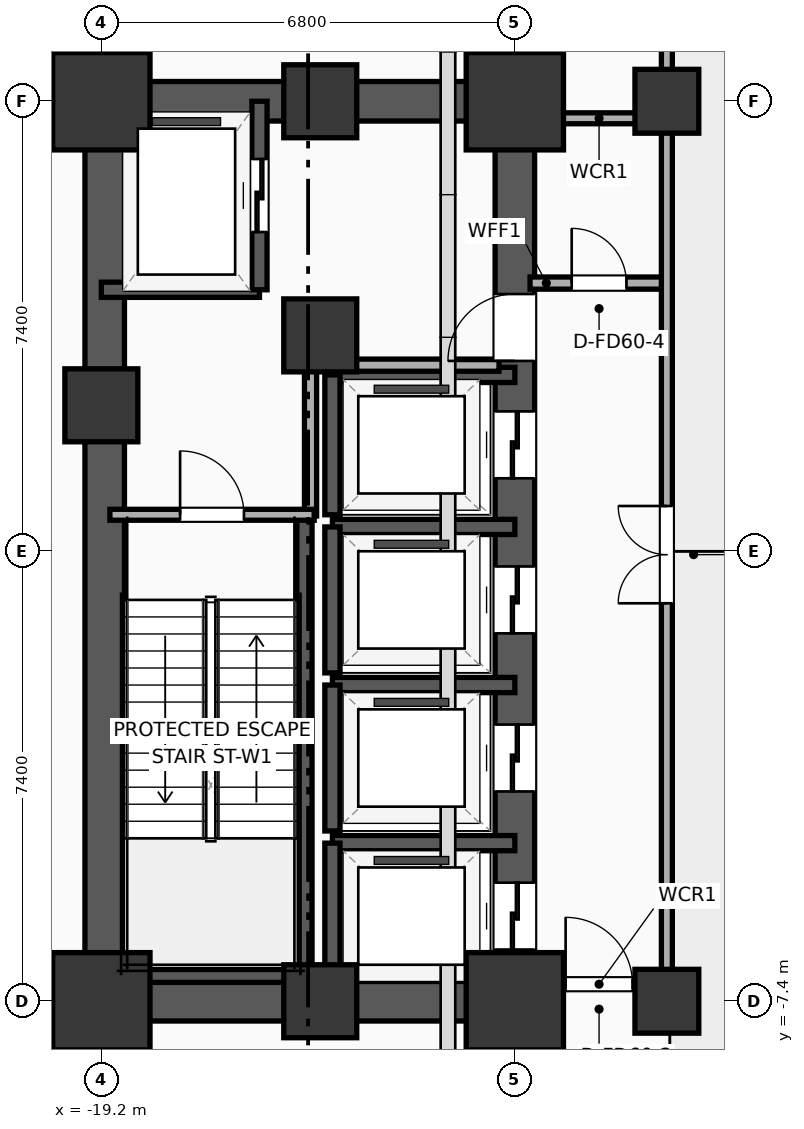
"""IFC4 building model, lengths in metres.
Left out: names, types, materials, properties, quantities, classifications, styles, units other than length and angle.
Written with IfcOpenShell. Run it as: python <this file> out.ifc"""

import sys

from ifc_helpers import new_model, si_unit, direction, frame, frame_2d, origin, origin_2d, place, context, subcontext, project, spatial, rectangle, extrude, element, fill, save


model = new_model("IFC4")
c1 = context("Model", 3, precision=1e-05, world=origin(), true_north=direction((0.0, 1.0)))
c2 = subcontext(c1, "Body", "Model", "MODEL_VIEW")
j1 = project(units=[si_unit("LENGTHUNIT", "METRE"), si_unit("PLANEANGLEUNIT", "RADIAN")], contexts=[c1])
p1 = place(None, origin())
s1 = spatial("IfcSite", under=j1, at=p1, CompositionType="ELEMENT")
p2 = place(p1, origin())
s2 = spatial("IfcBuilding", under=s1, at=p2, CompositionType="ELEMENT")
p3 = place(p2, origin())
s3 = spatial("IfcBuildingStorey", under=s2, at=p3, CompositionType="ELEMENT", Elevation=0.0)
p4 = place(p3, frame((-19.2, -7.4, 0.0), z_axis=(0.0, 0.0, 1.0), x_axis=(1.0, 0.0, 0.0)))
e1 = element("IfcColumn", 1, at=p4, inside=s3, PredefinedType="COLUMN", context=c2, shape_type="SweptSolid", body=[
    extrude(rectangle(XDim=1.6, YDim=1.6, at=origin_2d()), origin(), (0.0, 0.0, 1.0), 5.2),
])
p5 = place(p3, frame((-19.2, 2.4, 0.0), z_axis=(0.0, 0.0, 1.0), x_axis=(1.0, 0.0, 0.0)))
e2 = element("IfcColumn", 2, at=p5, inside=s3, PredefinedType="COLUMN", context=c2, shape_type="SweptSolid", body=[
    extrude(rectangle(XDim=1.2, YDim=1.2, at=origin_2d()), origin(), (0.0, 0.0, 1.0), 5.2),
])
p6 = place(p3, frame((-19.2, 7.4, 0.0), z_axis=(0.0, 0.0, 1.0), x_axis=(1.0, 0.0, 0.0)))
e3 = element("IfcColumn", 3, at=p6, inside=s3, PredefinedType="COLUMN", context=c2, shape_type="SweptSolid", body=[
    extrude(rectangle(XDim=1.6, YDim=1.6, at=origin_2d()), origin(), (0.0, 0.0, 1.0), 5.2),
])
for number, where, z_axis, x_axis in (
    (4, (-15.6, -7.4, 0.0), (0.0, 0.0, 1.0), (1.0, 0.0, 0.0)),
    (5, (-15.6, 7.4, 0.0), (0.0, 0.0, 1.0), (1.0, 0.0, 0.0)),
):
    element("IfcColumn", number, at=place(p3, frame(where, z_axis=z_axis, x_axis=x_axis)), inside=s3, PredefinedType="COLUMN", context=c2, shape_type="SweptSolid", body=[
        extrude(rectangle(XDim=1.2, YDim=1.2, at=origin_2d()), origin(), (0.0, 0.0, 1.0), 5.2),
    ])
p7 = place(p3, frame((-12.4, -7.4, 0.0), z_axis=(0.0, 0.0, 1.0), x_axis=(1.0, 0.0, 0.0)))
e6 = element("IfcColumn", 6, at=p7, inside=s3, PredefinedType="COLUMN", context=c2, shape_type="SweptSolid", body=[
    extrude(rectangle(XDim=1.6, YDim=1.6, at=origin_2d()), origin(), (0.0, 0.0, 1.0), 5.2),
])
p8 = place(p3, frame((-15.6, 3.55, 0.0), z_axis=(0.0, 0.0, 1.0), x_axis=(1.0, 0.0, 0.0)))
e7 = element("IfcColumn", 7, at=p8, inside=s3, PredefinedType="COLUMN", context=c2, shape_type="SweptSolid", body=[
    extrude(rectangle(XDim=1.2, YDim=1.2, at=origin_2d()), origin(), (0.0, 0.0, 1.0), 5.2),
])
p9 = place(p3, frame((-12.4, 7.4, 0.0), z_axis=(0.0, 0.0, 1.0), x_axis=(1.0, 0.0, 0.0)))
e8 = element("IfcColumn", 8, at=p9, inside=s3, PredefinedType="COLUMN", context=c2, shape_type="SweptSolid", body=[
    extrude(rectangle(XDim=1.6, YDim=1.6, at=origin_2d()), origin(), (0.0, 0.0, 1.0), 5.2),
])
for number, where, z_axis, x_axis in (
    (9, (-19.525, -7.4, 0.0), (0.0, 0.0, 1.0), (1.0, 0.0, 0.0)),
    (10, (-19.525, 7.4, 0.0), (0.0, 0.0, 1.0), (1.0, 0.0, 0.0)),
):
    element("IfcWall", number, at=place(p3, frame(where, z_axis=z_axis, x_axis=x_axis)), inside=s3, PredefinedType="SHEAR", context=c2, shape_type="SweptSolid", body=[
        extrude(rectangle(XDim=7.45, YDim=0.65, at=frame_2d((3.725, 0.0))), origin(), (0.0, 0.0, 1.0), 4.92),
    ])
p10 = place(p3, frame((-19.145, -7.4, 0.0), z_axis=(0.0, 0.0, 1.0), x_axis=(0.0, 1.0, 0.0)))
e11 = element("IfcWall", 11, at=p10, inside=s3, PredefinedType="SHEAR", context=c2, shape_type="SweptSolid", body=[
    extrude(rectangle(XDim=14.8, YDim=0.65, at=frame_2d((7.4, 0.0))), origin(), (0.0, 0.0, 1.0), 4.92),
])
p11 = place(p3, frame((-12.4, -7.4, 0.0), z_axis=(0.0, 0.0, 1.0), x_axis=(0.0, 1.0, 0.0)))
e12 = element("IfcWall", 12, at=p11, inside=s3, PredefinedType="SHEAR", context=c2, shape_type="SweptSolid", body=[
    extrude(rectangle(XDim=14.8, YDim=0.65, at=frame_2d((7.4, 0.0))), origin(), (0.0, 0.0, 1.0), 4.92),
])
p12 = place(p11, frame((0.85, 0.0, 0.0)))
e13 = element("IfcOpeningElement", 13, at=p12, cuts=e12, PredefinedType="OPENING", context=c2, shape_type="SweptSolid", body=[
    extrude(rectangle(XDim=1.1, YDim=2.05, at=frame_2d((0.55, 1.025))), frame((0.0, 0.335, 0.0), z_axis=(0.0, -1.0, 0.0), x_axis=(1.0, 0.0, 0.0)), (0.0, 0.0, 1.0), 0.67),
])
p13 = place(p11, frame((3.45, 0.0, 0.0)))
e14 = element("IfcOpeningElement", 14, at=p13, cuts=e12, PredefinedType="OPENING", context=c2, shape_type="SweptSolid", body=[
    extrude(rectangle(XDim=1.1, YDim=2.05, at=frame_2d((0.55, 1.025))), frame((0.0, 0.335, 0.0), z_axis=(0.0, -1.0, 0.0), x_axis=(1.0, 0.0, 0.0)), (0.0, 0.0, 1.0), 0.67),
])
p14 = place(p11, frame((6.05, 0.0, 0.0)))
e15 = element("IfcOpeningElement", 15, at=p14, cuts=e12, PredefinedType="OPENING", context=c2, shape_type="SweptSolid", body=[
    extrude(rectangle(XDim=1.1, YDim=2.05, at=frame_2d((0.55, 1.025))), frame((0.0, 0.335, 0.0), z_axis=(0.0, -1.0, 0.0), x_axis=(1.0, 0.0, 0.0)), (0.0, 0.0, 1.0), 0.67),
])
p15 = place(p11, frame((8.6, 0.0, 0.0)))
e16 = element("IfcOpeningElement", 16, at=p15, cuts=e12, PredefinedType="OPENING", context=c2, shape_type="SweptSolid", body=[
    extrude(rectangle(XDim=1.1, YDim=2.05, at=frame_2d((0.55, 1.025))), frame((0.0, 0.335, 0.0), z_axis=(0.0, -1.0, 0.0), x_axis=(1.0, 0.0, 0.0)), (0.0, 0.0, 1.0), 0.67),
])
p16 = place(p11, frame((10.53, 0.0, 0.0)))
e17 = element("IfcOpeningElement", 17, at=p16, cuts=e12, PredefinedType="OPENING", context=c2, shape_type="SweptSolid", body=[
    extrude(rectangle(XDim=1.1, YDim=2.05, at=frame_2d((0.55, 1.025))), frame((0.0, 0.335, 0.0), z_axis=(0.0, -1.0, 0.0), x_axis=(1.0, 0.0, 0.0)), (0.0, 0.0, 1.0), 0.67),
])
p17 = place(p3, frame((-15.86, -7.085, 0.0), z_axis=(0.0, 0.0, 1.0), x_axis=(0.0, 1.0, 0.0)))
e18 = element("IfcWall", 18, at=p17, inside=s3, PredefinedType="SOLIDWALL", context=c2, shape_type="SweptSolid", body=[
    extrude(rectangle(XDim=7.685, YDim=0.25, at=frame_2d((3.843, 0.0))), origin(), (0.0, 0.0, 1.0), 4.92),
])
p18 = place(p3, frame((-19.2, -6.965, 0.0), z_axis=(0.0, 0.0, 1.0), x_axis=(1.0, 0.0, 0.0)))
e19 = element("IfcWall", 19, at=p18, inside=s3, PredefinedType="SOLIDWALL", context=c2, shape_type="SweptSolid", body=[
    extrude(rectangle(XDim=3.46, YDim=0.25, at=frame_2d((1.73, 0.0))), origin(), (0.0, 0.0, 1.0), 4.92),
])
for number, where, z_axis, x_axis in (
    (20, (-9.9, -7.4, 0.0), (0.0, 0.0, 1.0), (1.0, 0.0, 0.0)),
    (21, (-9.9, 7.4, 0.0), (0.0, 0.0, 1.0), (1.0, 0.0, 0.0)),
):
    element("IfcColumn", number, at=place(p3, frame(where, z_axis=z_axis, x_axis=x_axis)), inside=s3, PredefinedType="COLUMN", context=c2, shape_type="SweptSolid", body=[
        extrude(rectangle(XDim=1.05, YDim=1.05, at=origin_2d()), origin(), (0.0, 0.0, 1.0), 5.2),
    ])
p19 = place(p3, frame((-19.2, 4.3, 0.0), z_axis=(0.0, 0.0, 1.0), x_axis=(1.0, 0.0, 0.0)))
e22 = element("IfcWall", 22, at=p19, inside=s3, PredefinedType="SOLIDWALL", context=c2, shape_type="SweptSolid", body=[
    extrude(rectangle(XDim=2.6, YDim=0.25, at=frame_2d((1.3, 0.0))), origin(), (0.0, 0.0, 1.0), 4.92),
])
p20 = place(p3, frame((-16.6, 4.3, 0.0), z_axis=(0.0, 0.0, 1.0), x_axis=(0.0, 1.0, 0.0)))
e23 = element("IfcWall", 23, at=p20, inside=s3, PredefinedType="SOLIDWALL", context=c2, shape_type="SweptSolid", body=[
    extrude(rectangle(XDim=3.1, YDim=0.25, at=frame_2d((1.55, 0.0))), origin(), (0.0, 0.0, 1.0), 4.92),
])
p21 = place(p20, frame((0.95, 0.0, 0.0)))
e24 = element("IfcOpeningElement", 24, at=p21, cuts=e23, PredefinedType="OPENING", context=c2, shape_type="SweptSolid", body=[
    extrude(rectangle(XDim=1.2, YDim=2.05, at=frame_2d((0.6, 1.025))), frame((0.0, 0.135, 0.0), z_axis=(0.0, -1.0, 0.0), x_axis=(1.0, 0.0, 0.0)), (0.0, 0.0, 1.0), 0.27),
])
p22 = place(p3, frame((-12.4, -4.8, 0.0), z_axis=(0.0, 0.0, 1.0), x_axis=(-1.0, 0.0, 0.0)))
e25 = element("IfcWall", 25, at=p22, inside=s3, PredefinedType="SOLIDWALL", context=c2, shape_type="SweptSolid", body=[
    extrude(rectangle(XDim=3.0, YDim=0.25, at=frame_2d((1.5, 0.0))), origin(), (0.0, 0.0, 1.0), 4.92),
])
p23 = place(p3, frame((-15.4, -4.8, 0.0), z_axis=(0.0, 0.0, 1.0), x_axis=(0.0, -1.0, 0.0)))
e26 = element("IfcWall", 26, at=p23, inside=s3, PredefinedType="SOLIDWALL", context=c2, shape_type="SweptSolid", body=[
    extrude(rectangle(XDim=2.6, YDim=0.25, at=frame_2d((1.3, 0.0))), origin(), (0.0, 0.0, 1.0), 4.92),
])
p24 = place(p3, frame((-12.4, -2.2, 0.0), z_axis=(0.0, 0.0, 1.0), x_axis=(-1.0, 0.0, 0.0)))
e27 = element("IfcWall", 27, at=p24, inside=s3, PredefinedType="SOLIDWALL", context=c2, shape_type="SweptSolid", body=[
    extrude(rectangle(XDim=3.0, YDim=0.25, at=frame_2d((1.5, 0.0))), origin(), (0.0, 0.0, 1.0), 4.92),
])
p25 = place(p3, frame((-15.4, -2.2, 0.0), z_axis=(0.0, 0.0, 1.0), x_axis=(0.0, -1.0, 0.0)))
e28 = element("IfcWall", 28, at=p25, inside=s3, PredefinedType="SOLIDWALL", context=c2, shape_type="SweptSolid", body=[
    extrude(rectangle(XDim=2.4, YDim=0.25, at=frame_2d((1.2, 0.0))), origin(), (0.0, 0.0, 1.0), 4.92),
])
p26 = place(p3, frame((-12.4, 0.4, 0.0), z_axis=(0.0, 0.0, 1.0), x_axis=(-1.0, 0.0, 0.0)))
e29 = element("IfcWall", 29, at=p26, inside=s3, PredefinedType="SOLIDWALL", context=c2, shape_type="SweptSolid", body=[
    extrude(rectangle(XDim=3.0, YDim=0.25, at=frame_2d((1.5, 0.0))), origin(), (0.0, 0.0, 1.0), 4.92),
])
p27 = place(p3, frame((-15.4, 0.4, 0.0), z_axis=(0.0, 0.0, 1.0), x_axis=(0.0, -1.0, 0.0)))
e30 = element("IfcWall", 30, at=p27, inside=s3, PredefinedType="SOLIDWALL", context=c2, shape_type="SweptSolid", body=[
    extrude(rectangle(XDim=2.4, YDim=0.25, at=frame_2d((1.2, 0.0))), origin(), (0.0, 0.0, 1.0), 4.92),
])
p28 = place(p3, frame((-12.4, 2.9, 0.0), z_axis=(0.0, 0.0, 1.0), x_axis=(-1.0, 0.0, 0.0)))
e31 = element("IfcWall", 31, at=p28, inside=s3, PredefinedType="SOLIDWALL", context=c2, shape_type="SweptSolid", body=[
    extrude(rectangle(XDim=3.0, YDim=0.25, at=frame_2d((1.5, 0.0))), origin(), (0.0, 0.0, 1.0), 4.92),
])
p29 = place(p3, frame((-15.4, 2.9, 0.0), z_axis=(0.0, 0.0, 1.0), x_axis=(0.0, -1.0, 0.0)))
e32 = element("IfcWall", 32, at=p29, inside=s3, PredefinedType="SOLIDWALL", context=c2, shape_type="SweptSolid", body=[
    extrude(rectangle(XDim=2.3, YDim=0.25, at=frame_2d((1.15, 0.0))), origin(), (0.0, 0.0, 1.0), 4.92),
])
p30 = place(p3, frame((-15.76, 0.58, 0.0), z_axis=(0.0, 0.0, 1.0), x_axis=(0.0, 1.0, 0.0)))
e33 = element("IfcWall", 33, at=p30, inside=s3, PredefinedType="PARTITIONING", context=c2, shape_type="SweptSolid", body=[
    extrude(rectangle(XDim=2.52, YDim=0.2, at=frame_2d((1.26, 0.0))), origin(), (0.0, 0.0, 1.0), 4.92),
])
p31 = place(p3, frame((-15.82, 3.06, 0.0), z_axis=(0.0, 0.0, 1.0), x_axis=(1.0, 0.0, 0.0)))
e34 = element("IfcWall", 34, at=p31, inside=s3, PredefinedType="PARTITIONING", context=c2, shape_type="SweptSolid", body=[
    extrude(rectangle(XDim=3.16, YDim=0.2, at=frame_2d((1.58, 0.0))), origin(), (0.0, 0.0, 1.0), 4.92),
])
p32 = place(p3, frame((-19.06, 0.6, 0.0), z_axis=(0.0, 0.0, 1.0), x_axis=(1.0, 0.0, 0.0)))
e35 = element("IfcWall", 35, at=p32, inside=s3, PredefinedType="PARTITIONING", context=c2, shape_type="SweptSolid", body=[
    extrude(rectangle(XDim=3.36, YDim=0.18, at=frame_2d((1.68, 0.0))), origin(), (0.0, 0.0, 1.0), 4.92),
])
p33 = place(p32, frame((1.155, 0.0, 0.0)))
e36 = element("IfcOpeningElement", 36, at=p33, cuts=e35, PredefinedType="OPENING", context=c2, shape_type="SweptSolid", body=[
    extrude(rectangle(XDim=1.05, YDim=2.05, at=frame_2d((0.525, 1.025))), frame((0.0, 0.1, 0.0), z_axis=(0.0, -1.0, 0.0), x_axis=(1.0, 0.0, 0.0)), (0.0, 0.0, 1.0), 0.2),
])
p34 = place(p3, frame((-12.15, 4.41, 0.0), z_axis=(0.0, 0.0, 1.0), x_axis=(1.0, 0.0, 0.0)))
e37 = element("IfcWall", 37, at=p34, inside=s3, PredefinedType="PARTITIONING", context=c2, shape_type="SweptSolid", body=[
    extrude(rectangle(XDim=2.27, YDim=0.2, at=frame_2d((1.135, 0.0))), origin(), (0.0, 0.0, 1.0), 4.92),
])
p35 = place(p34, frame((0.685, 0.0, 0.0)))
e38 = element("IfcOpeningElement", 38, at=p35, cuts=e37, PredefinedType="OPENING", context=c2, shape_type="SweptSolid", body=[
    extrude(rectangle(XDim=0.9, YDim=2.05, at=frame_2d((0.45, 1.025))), frame((0.0, 0.11, 0.0), z_axis=(0.0, -1.0, 0.0), x_axis=(1.0, 0.0, 0.0)), (0.0, 0.0, 1.0), 0.22),
])
p36 = place(p3, frame((-12.15, 7.12, 0.0), z_axis=(0.0, 0.0, 1.0), x_axis=(1.0, 0.0, 0.0)))
e39 = element("IfcWall", 39, at=p36, inside=s3, PredefinedType="PARTITIONING", context=c2, shape_type="SweptSolid", body=[
    extrude(rectangle(XDim=2.27, YDim=0.18, at=frame_2d((1.135, 0.0))), origin(), (0.0, 0.0, 1.0), 4.21),
])
p37 = place(p3, frame((-12.15, -7.12, 0.0), z_axis=(0.0, 0.0, 1.0), x_axis=(1.0, 0.0, 0.0)))
e40 = element("IfcWall", 40, at=p37, inside=s3, PredefinedType="PARTITIONING", context=c2, shape_type="SweptSolid", body=[
    extrude(rectangle(XDim=2.27, YDim=0.18, at=frame_2d((1.135, 0.0))), origin(), (0.0, 0.0, 1.0), 4.21),
])
p38 = place(p37, frame((0.585, 0.0, 0.0)))
e41 = element("IfcOpeningElement", 41, at=p38, cuts=e40, PredefinedType="OPENING", context=c2, shape_type="SweptSolid", body=[
    extrude(rectangle(XDim=1.1, YDim=2.05, at=frame_2d((0.55, 1.025))), frame((0.0, 0.1, 0.0), z_axis=(0.0, -1.0, 0.0), x_axis=(1.0, 0.0, 0.0)), (0.0, 0.0, 1.0), 0.2),
])
p39 = place(p3, frame((-9.9, -7.12, 0.0), z_axis=(0.0, 0.0, 1.0), x_axis=(0.0, 1.0, 0.0)))
e42 = element("IfcWall", 42, at=p39, inside=s3, PredefinedType="PARTITIONING", context=c2, shape_type="SweptSolid", body=[
    extrude(rectangle(XDim=16.82, YDim=0.18, at=frame_2d((8.41, 0.0))), origin(), (0.0, 0.0, 1.0), 4.21),
])
p40 = place(p39, frame((6.264, 0.0, 0.0)))
e43 = element("IfcOpeningElement", 43, at=p40, cuts=e42, PredefinedType="OPENING", context=c2, shape_type="SweptSolid", body=[
    extrude(rectangle(XDim=1.6, YDim=2.05, at=frame_2d((0.8, 1.025))), frame((0.0, 0.1, 0.0), z_axis=(0.0, -1.0, 0.0), x_axis=(1.0, 0.0, 0.0)), (0.0, 0.0, 1.0), 0.2),
])
p41 = place(p21, origin())
e44 = element("IfcDoor", 44, at=p41, inside=s3, OperationType="SLIDING_TO_LEFT", PredefinedType="DOOR", context=c2, shape_type="SweptSolid", body=[
    extrude(rectangle(XDim=1.2, YDim=2.05, at=frame_2d((0.6, 1.025))), frame((0.0, 0.025, 0.0), z_axis=(0.0, -1.0, 0.0), x_axis=(1.0, 0.0, 0.0)), (0.0, 0.0, 1.0), 0.05),
])
fill(e24, e44)
p42 = place(p12, origin())
e45 = element("IfcDoor", 45, at=p42, inside=s3, OperationType="SLIDING_TO_LEFT", PredefinedType="DOOR", context=c2, shape_type="SweptSolid", body=[
    extrude(rectangle(XDim=1.1, YDim=2.05, at=frame_2d((0.55, 1.025))), frame((0.0, 0.025, 0.0), z_axis=(0.0, -1.0, 0.0), x_axis=(1.0, 0.0, 0.0)), (0.0, 0.0, 1.0), 0.05),
])
fill(e13, e45)
p43 = place(p13, origin())
e46 = element("IfcDoor", 46, at=p43, inside=s3, OperationType="SLIDING_TO_LEFT", PredefinedType="DOOR", context=c2, shape_type="SweptSolid", body=[
    extrude(rectangle(XDim=1.1, YDim=2.05, at=frame_2d((0.55, 1.025))), frame((0.0, 0.025, 0.0), z_axis=(0.0, -1.0, 0.0), x_axis=(1.0, 0.0, 0.0)), (0.0, 0.0, 1.0), 0.05),
])
fill(e14, e46)
p44 = place(p14, origin())
e47 = element("IfcDoor", 47, at=p44, inside=s3, OperationType="SLIDING_TO_LEFT", PredefinedType="DOOR", context=c2, shape_type="SweptSolid", body=[
    extrude(rectangle(XDim=1.1, YDim=2.05, at=frame_2d((0.55, 1.025))), frame((0.0, 0.025, 0.0), z_axis=(0.0, -1.0, 0.0), x_axis=(1.0, 0.0, 0.0)), (0.0, 0.0, 1.0), 0.05),
])
fill(e15, e47)
p45 = place(p15, origin())
e48 = element("IfcDoor", 48, at=p45, inside=s3, OperationType="SLIDING_TO_LEFT", PredefinedType="DOOR", context=c2, shape_type="SweptSolid", body=[
    extrude(rectangle(XDim=1.1, YDim=2.05, at=frame_2d((0.55, 1.025))), frame((0.0, 0.025, 0.0), z_axis=(0.0, -1.0, 0.0), x_axis=(1.0, 0.0, 0.0)), (0.0, 0.0, 1.0), 0.05),
])
fill(e16, e48)
p46 = place(p33, origin())
e49 = element("IfcDoor", 49, at=p46, inside=s3, OperationType="SINGLE_SWING_LEFT", PredefinedType="DOOR", context=c2, shape_type="SweptSolid", body=[
    extrude(rectangle(XDim=1.05, YDim=2.05, at=frame_2d((0.525, 1.025))), frame((0.0, 0.025, 0.0), z_axis=(0.0, -1.0, 0.0), x_axis=(1.0, 0.0, 0.0)), (0.0, 0.0, 1.0), 0.05),
])
fill(e36, e49)
p47 = place(p35, origin())
e50 = element("IfcDoor", 50, at=p47, inside=s3, OperationType="SINGLE_SWING_LEFT", PredefinedType="DOOR", context=c2, shape_type="SweptSolid", body=[
    extrude(rectangle(XDim=0.9, YDim=2.05, at=frame_2d((0.45, 1.025))), frame((0.0, 0.025, 0.0), z_axis=(0.0, -1.0, 0.0), x_axis=(1.0, 0.0, 0.0)), (0.0, 0.0, 1.0), 0.05),
])
fill(e38, e50)
p48 = place(p38, origin())
e51 = element("IfcDoor", 51, at=p48, inside=s3, OperationType="SINGLE_SWING_LEFT", PredefinedType="DOOR", context=c2, shape_type="SweptSolid", body=[
    extrude(rectangle(XDim=1.1, YDim=2.05, at=frame_2d((0.55, 1.025))), frame((0.0, 0.025, 0.0), z_axis=(0.0, -1.0, 0.0), x_axis=(1.0, 0.0, 0.0)), (0.0, 0.0, 1.0), 0.05),
])
fill(e41, e51)
p49 = place(p40, origin())
e52 = element("IfcDoor", 52, at=p49, inside=s3, OperationType="DOUBLE_DOOR_SINGLE_SWING", PredefinedType="DOOR", context=c2, shape_type="SweptSolid", body=[
    extrude(rectangle(XDim=1.6, YDim=2.05, at=frame_2d((0.8, 1.025))), frame((0.0, 0.025, 0.0), z_axis=(0.0, -1.0, 0.0), x_axis=(1.0, 0.0, 0.0)), (0.0, 0.0, 1.0), 0.05),
])
fill(e43, e52)
p50 = place(p16, origin())
e53 = element("IfcDoor", 53, at=p50, inside=s3, OperationType="SINGLE_SWING_LEFT", PredefinedType="DOOR", context=c2, shape_type="SweptSolid", body=[
    extrude(rectangle(XDim=1.1, YDim=2.05, at=frame_2d((0.55, 1.025))), frame((0.0, 0.025, 0.0), z_axis=(0.0, -1.0, 0.0), x_axis=(1.0, 0.0, 0.0)), (0.0, 0.0, 1.0), 0.05),
])
fill(e17, e53)
save(model, sys.argv[1])
